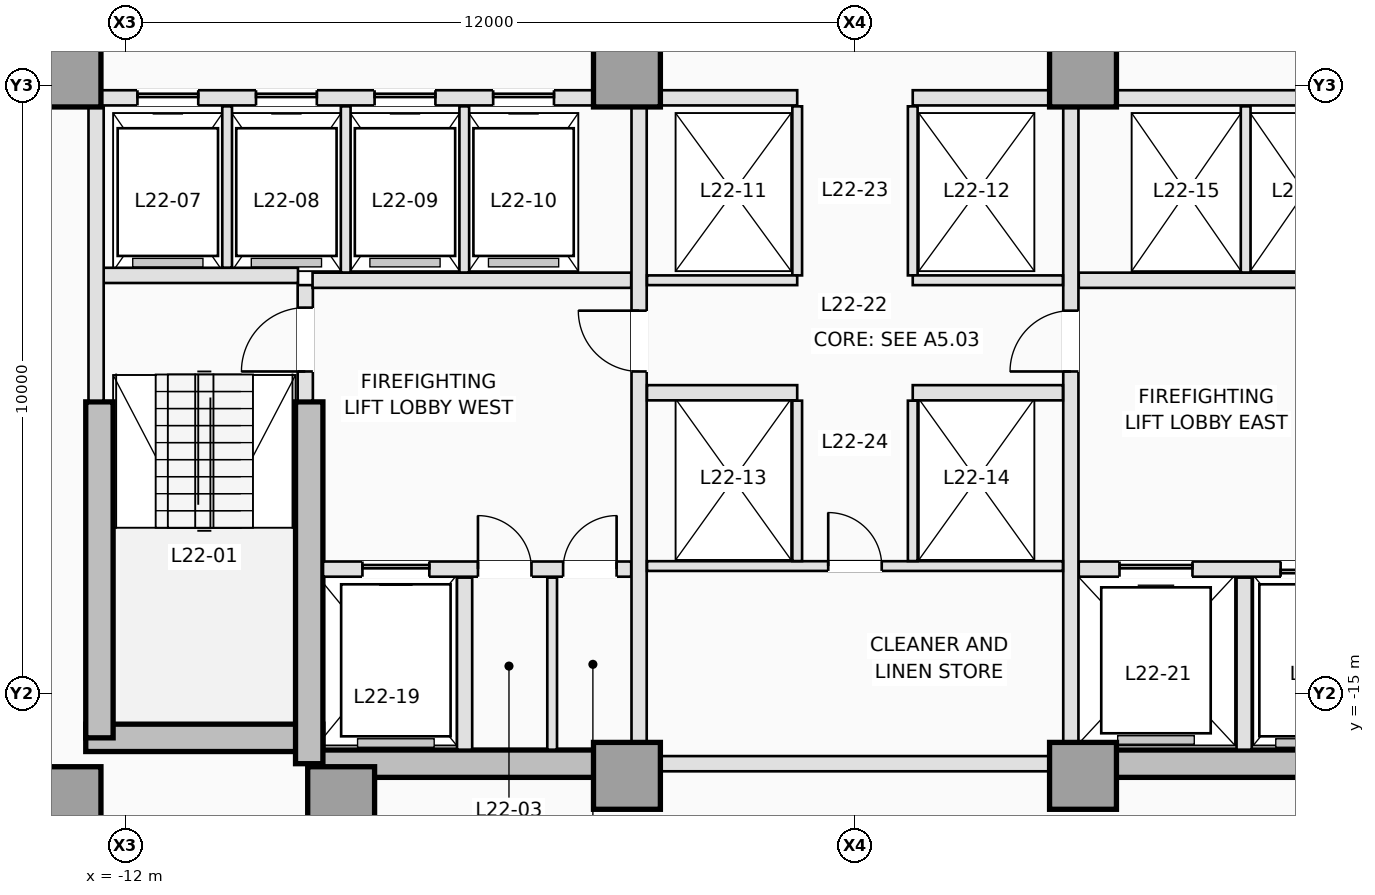
"""IFC4 building model, lengths in metres.
Left out: names, types, materials, properties, quantities, classifications, styles, units other than length and angle.
Written with IfcOpenShell. Run it as: python <this file> out.ifc"""

import sys

from ifc_helpers import new_model, si_unit, direction, frame, frame_2d, origin, origin_2d, place, context, subcontext, project, spatial, rectangle, extrude, element, fill, save


model = new_model("IFC4")
c1 = context("Model", 3, precision=1e-05, world=origin(), true_north=direction((0.0, 1.0)))
c2 = subcontext(c1, "Body", "Model", "MODEL_VIEW")
j1 = project(units=[si_unit("LENGTHUNIT", "METRE"), si_unit("PLANEANGLEUNIT", "RADIAN")], contexts=[c1])
p1 = place(None, origin())
s1 = spatial("IfcSite", under=j1, at=p1, CompositionType="ELEMENT")
p2 = place(p1, origin())
s2 = spatial("IfcBuilding", under=s1, at=p2, CompositionType="ELEMENT")
p3 = place(p2, frame((0.0, 0.0, 83.6)))
s3 = spatial("IfcBuildingStorey", under=s2, at=p3, CompositionType="ELEMENT", Elevation=83.6)
p4 = place(p3, frame((-12.65, -15.725, 0.0), z_axis=(0.0, 0.0, 1.0), x_axis=(1.0, 0.0, 0.0)))
e1 = element("IfcWall", 1, at=p4, inside=s3, PredefinedType="SHEAR", context=c2, shape_type="SweptSolid", body=[
    extrude(rectangle(XDim=3.9, YDim=0.45, at=frame_2d((1.95, 0.0))), origin(), (0.0, 0.0, 1.0), 3.5),
])
for number, where, z_axis, x_axis in (
    (2, (-8.975, -16.15, 0.0), (0.0, 0.0, 1.0), (1.0, 0.0, 0.0)),
    (3, (3.75, -16.15, 0.0), (0.0, 0.0, 1.0), (1.0, 0.0, 0.0)),
):
    element("IfcWall", number, at=place(p3, frame(where, z_axis=z_axis, x_axis=x_axis)), inside=s3, PredefinedType="SHEAR", context=c2, shape_type="SweptSolid", body=[
        extrude(rectangle(XDim=5.225, YDim=0.45, at=frame_2d((2.613, 0.0))), origin(), (0.0, 0.0, 1.0), 3.5),
    ])
p5 = place(p3, frame((-12.425, -15.725, 0.0), z_axis=(0.0, 0.0, 1.0), x_axis=(0.0, 1.0, 0.0)))
e4 = element("IfcWall", 4, at=p5, inside=s3, PredefinedType="SHEAR", context=c2, shape_type="SweptSolid", body=[
    extrude(rectangle(XDim=5.525, YDim=0.45, at=frame_2d((2.763, 0.0))), origin(), (0.0, 0.0, 1.0), 3.5),
])
p6 = place(p3, frame((-8.975, -16.15, 0.0), z_axis=(0.0, 0.0, 1.0), x_axis=(0.0, 1.0, 0.0)))
e5 = element("IfcWall", 5, at=p6, inside=s3, PredefinedType="SHEAR", context=c2, shape_type="SweptSolid", body=[
    extrude(rectangle(XDim=5.95, YDim=0.45, at=frame_2d((2.975, 0.0))), origin(), (0.0, 0.0, 1.0), 3.5),
])
for number, where, z_axis, x_axis in (
    (6, (-12.95, -16.75, 0.0), (0.0, 0.0, 1.0), (1.0, 0.0, 0.0)),
    (7, (-8.45, -16.75, 0.0), (0.0, 0.0, 1.0), (1.0, 0.0, 0.0)),
    (8, (-3.75, -16.35, 0.0), (0.0, 0.0, 1.0), (1.0, 0.0, 0.0)),
    (9, (3.75, -16.35, 0.0), (0.0, 0.0, 1.0), (1.0, 0.0, 0.0)),
    (10, (-12.95, -4.8, 0.0), (0.0, 0.0, 1.0), (1.0, 0.0, 0.0)),
    (11, (-3.75, -4.8, 0.0), (0.0, 0.0, 1.0), (1.0, 0.0, 0.0)),
    (12, (3.75, -4.8, 0.0), (0.0, 0.0, 1.0), (1.0, 0.0, 0.0)),
):
    element("IfcColumn", number, at=place(p3, frame(where, z_axis=z_axis, x_axis=x_axis)), inside=s3, PredefinedType="COLUMN", context=c2, shape_type="SweptSolid", body=[
        extrude(rectangle(XDim=1.1, YDim=1.1, at=origin_2d()), origin(), (0.0, 0.0, 1.0), 3.5),
    ])
p7 = place(p3, frame((-9.04, -10.18, 0.0), z_axis=(0.0, 0.0, 1.0), x_axis=(0.0, 1.0, 0.0)))
e13 = element("IfcWall", 13, at=p7, inside=s3, PredefinedType="PARTITIONING", context=c2, shape_type="SweptSolid", body=[
    extrude(rectangle(XDim=1.9, YDim=0.25, at=frame_2d((0.95, 0.0))), origin(), (0.0, 0.0, 1.0), 3.25),
])
p8 = place(p7, frame((0.48, 0.0, 0.0)))
e14 = element("IfcOpeningElement", 14, at=p8, cuts=e13, PredefinedType="OPENING", context=c2, shape_type="SweptSolid", body=[
    extrude(rectangle(XDim=1.05, YDim=2.15, at=frame_2d((0.525, 1.075))), frame((0.0, 0.135, 0.0), z_axis=(0.0, -1.0, 0.0), x_axis=(1.0, 0.0, 0.0)), (0.0, 0.0, 1.0), 0.27),
])
p9 = place(p3, frame((-12.38, -8.12, 0.0), z_axis=(0.0, 0.0, 1.0), x_axis=(1.0, 0.0, 0.0)))
e15 = element("IfcWall", 15, at=p9, inside=s3, PredefinedType="PARTITIONING", context=c2, shape_type="SweptSolid", body=[
    extrude(rectangle(XDim=3.22, YDim=0.25, at=frame_2d((1.61, 0.0))), origin(), (0.0, 0.0, 1.0), 3.25),
])
p10 = place(p3, frame((-12.48, -10.18, 0.0), z_axis=(0.0, 0.0, 1.0), x_axis=(0.0, 1.0, 0.0)))
e16 = element("IfcWall", 16, at=p10, inside=s3, PredefinedType="PARTITIONING", context=c2, shape_type="SweptSolid", body=[
    extrude(rectangle(XDim=4.828, YDim=0.25, at=frame_2d((2.414, 0.0))), origin(), (0.0, 0.0, 1.0), 3.25),
])
p11 = place(p3, frame((-8.748, -12.95, 0.0), z_axis=(0.0, 0.0, 1.0), x_axis=(1.0, 0.0, 0.0)))
e17 = element("IfcWall", 17, at=p11, inside=s3, PredefinedType="PARTITIONING", context=c2, shape_type="SweptSolid", body=[
    extrude(rectangle(XDim=5.068, YDim=0.25, at=frame_2d((2.534, 0.0))), origin(), (0.0, 0.0, 1.0), 3.25),
])
p12 = place(p11, frame((0.648, 0.0, 0.0)))
e18 = element("IfcOpeningElement", 18, at=p12, cuts=e17, PredefinedType="OPENING", context=c2, shape_type="SweptSolid", body=[
    extrude(rectangle(XDim=1.1, YDim=2.15, at=frame_2d((0.55, 1.075))), frame((0.0, 0.135, 0.0), z_axis=(0.0, -1.0, 0.0), x_axis=(1.0, 0.0, 0.0)), (0.0, 0.0, 1.0), 0.27),
])
p13 = place(p11, frame((2.548, 0.0, 0.0)))
e19 = element("IfcOpeningElement", 19, at=p13, cuts=e17, PredefinedType="OPENING", context=c2, shape_type="SweptSolid", body=[
    extrude(rectangle(XDim=0.88, YDim=2.1, at=frame_2d((0.44, 1.05))), frame((0.0, 0.135, 0.0), z_axis=(0.0, -1.0, 0.0), x_axis=(1.0, 0.0, 0.0)), (0.0, 0.0, 1.0), 0.27),
])
p14 = place(p11, frame((3.948, 0.0, 0.0)))
e20 = element("IfcOpeningElement", 20, at=p14, cuts=e17, PredefinedType="OPENING", context=c2, shape_type="SweptSolid", body=[
    extrude(rectangle(XDim=0.88, YDim=2.1, at=frame_2d((0.44, 1.05))), frame((0.0, 0.135, 0.0), z_axis=(0.0, -1.0, 0.0), x_axis=(1.0, 0.0, 0.0)), (0.0, 0.0, 1.0), 0.27),
])
p15 = place(p3, frame((3.68, -12.95, 0.0), z_axis=(0.0, 0.0, 1.0), x_axis=(1.0, 0.0, 0.0)))
e21 = element("IfcWall", 21, at=p15, inside=s3, PredefinedType="PARTITIONING", context=c2, shape_type="SweptSolid", body=[
    extrude(rectangle(XDim=5.068, YDim=0.25, at=frame_2d((2.534, 0.0))), origin(), (0.0, 0.0, 1.0), 3.25),
])
p16 = place(p15, frame((3.32, 0.0, 0.0)))
e22 = element("IfcOpeningElement", 22, at=p16, cuts=e21, PredefinedType="OPENING", context=c2, shape_type="SweptSolid", body=[
    extrude(rectangle(XDim=1.1, YDim=2.15, at=frame_2d((0.55, 1.075))), frame((0.0, 0.135, 0.0), z_axis=(0.0, -1.0, 0.0), x_axis=(1.0, 0.0, 0.0)), (0.0, 0.0, 1.0), 0.27),
])
p17 = place(p15, frame((0.67, 0.0, 0.0)))
e23 = element("IfcOpeningElement", 23, at=p17, cuts=e21, PredefinedType="OPENING", context=c2, shape_type="SweptSolid", body=[
    extrude(rectangle(XDim=1.2, YDim=2.15, at=frame_2d((0.6, 1.075))), frame((0.0, 0.135, 0.0), z_axis=(0.0, -1.0, 0.0), x_axis=(1.0, 0.0, 0.0)), (0.0, 0.0, 1.0), 0.27),
])
p18 = place(p3, frame((-6.42, -15.92, 0.0), z_axis=(0.0, 0.0, 1.0), x_axis=(0.0, 1.0, 0.0)))
e24 = element("IfcWall", 24, at=p18, inside=s3, PredefinedType="PARTITIONING", context=c2, shape_type="SweptSolid", body=[
    extrude(rectangle(XDim=2.83, YDim=0.25, at=frame_2d((1.415, 0.0))), origin(), (0.0, 0.0, 1.0), 3.25),
])
p19 = place(p3, frame((-4.98, -15.92, 0.0), z_axis=(0.0, 0.0, 1.0), x_axis=(0.0, 1.0, 0.0)))
e25 = element("IfcWall", 25, at=p19, inside=s3, PredefinedType="PARTITIONING", context=c2, shape_type="SweptSolid", body=[
    extrude(rectangle(XDim=2.83, YDim=0.16, at=frame_2d((1.415, 0.0))), origin(), (0.0, 0.0, 1.0), 3.25),
])
p20 = place(p3, frame((6.4, -15.92, 0.0), z_axis=(0.0, 0.0, 1.0), x_axis=(0.0, 1.0, 0.0)))
e26 = element("IfcWall", 26, at=p20, inside=s3, PredefinedType="PARTITIONING", context=c2, shape_type="SweptSolid", body=[
    extrude(rectangle(XDim=2.83, YDim=0.25, at=frame_2d((1.415, 0.0))), origin(), (0.0, 0.0, 1.0), 3.25),
])
for number, where, z_axis, x_axis in (
    (27, (-8.92, -8.2, 0.0), (0.0, 0.0, 1.0), (1.0, 0.0, 0.0)),
    (28, (3.68, -8.2, 0.0), (0.0, 0.0, 1.0), (1.0, 0.0, 0.0)),
):
    element("IfcWall", number, at=place(p3, frame(where, z_axis=z_axis, x_axis=x_axis)), inside=s3, PredefinedType="PARTITIONING", context=c2, shape_type="SweptSolid", body=[
        extrude(rectangle(XDim=5.24, YDim=0.25, at=frame_2d((2.62, 0.0))), origin(), (0.0, 0.0, 1.0), 3.25),
    ])
p21 = place(p3, frame((-3.55, -15.798, 0.0), z_axis=(0.0, 0.0, 1.0), x_axis=(0.0, 1.0, 0.0)))
e29 = element("IfcWall", 29, at=p21, inside=s3, PredefinedType="PARTITIONING", context=c2, shape_type="SweptSolid", body=[
    extrude(rectangle(XDim=10.446, YDim=0.25, at=frame_2d((5.223, 0.0))), origin(), (0.0, 0.0, 1.0), 3.25),
])
p22 = place(p21, frame((6.098, 0.0, 0.0)))
e30 = element("IfcOpeningElement", 30, at=p22, cuts=e29, PredefinedType="OPENING", context=c2, shape_type="SweptSolid", body=[
    extrude(rectangle(XDim=1.0, YDim=2.15, at=frame_2d((0.5, 1.075))), frame((0.0, 0.135, 0.0), z_axis=(0.0, -1.0, 0.0), x_axis=(1.0, 0.0, 0.0)), (0.0, 0.0, 1.0), 0.27),
])
p23 = place(p3, frame((3.55, -15.798, 0.0), z_axis=(0.0, 0.0, 1.0), x_axis=(0.0, 1.0, 0.0)))
e31 = element("IfcWall", 31, at=p23, inside=s3, PredefinedType="PARTITIONING", context=c2, shape_type="SweptSolid", body=[
    extrude(rectangle(XDim=10.446, YDim=0.25, at=frame_2d((5.223, 0.0))), origin(), (0.0, 0.0, 1.0), 3.25),
])
p24 = place(p23, frame((6.098, 0.0, 0.0)))
e32 = element("IfcOpeningElement", 32, at=p24, cuts=e31, PredefinedType="OPENING", context=c2, shape_type="SweptSolid", body=[
    extrude(rectangle(XDim=1.0, YDim=2.15, at=frame_2d((0.5, 1.075))), frame((0.0, 0.135, 0.0), z_axis=(0.0, -1.0, 0.0), x_axis=(1.0, 0.0, 0.0)), (0.0, 0.0, 1.0), 0.27),
])
p25 = place(p3, frame((-12.398, -5.2, 0.0), z_axis=(0.0, 0.0, 1.0), x_axis=(1.0, 0.0, 0.0)))
e33 = element("IfcWall", 33, at=p25, inside=s3, PredefinedType="PARTITIONING", context=c2, shape_type="SweptSolid", body=[
    extrude(rectangle(XDim=8.096, YDim=0.25, at=frame_2d((4.048, 0.0))), origin(), (0.0, 0.0, 1.0), 3.25),
])
p26 = place(p25, frame((0.598, 0.0, 0.0)))
e34 = element("IfcOpeningElement", 34, at=p26, cuts=e33, PredefinedType="OPENING", context=c2, shape_type="SweptSolid", body=[
    extrude(rectangle(XDim=1.0, YDim=2.15, at=frame_2d((0.5, 1.075))), frame((0.0, 0.135, 0.0), z_axis=(0.0, -1.0, 0.0), x_axis=(1.0, 0.0, 0.0)), (0.0, 0.0, 1.0), 0.27),
])
p27 = place(p25, frame((2.548, 0.0, 0.0)))
e35 = element("IfcOpeningElement", 35, at=p27, cuts=e33, PredefinedType="OPENING", context=c2, shape_type="SweptSolid", body=[
    extrude(rectangle(XDim=1.0, YDim=2.15, at=frame_2d((0.5, 1.075))), frame((0.0, 0.135, 0.0), z_axis=(0.0, -1.0, 0.0), x_axis=(1.0, 0.0, 0.0)), (0.0, 0.0, 1.0), 0.27),
])
p28 = place(p25, frame((4.498, 0.0, 0.0)))
e36 = element("IfcOpeningElement", 36, at=p28, cuts=e33, PredefinedType="OPENING", context=c2, shape_type="SweptSolid", body=[
    extrude(rectangle(XDim=1.0, YDim=2.15, at=frame_2d((0.5, 1.075))), frame((0.0, 0.135, 0.0), z_axis=(0.0, -1.0, 0.0), x_axis=(1.0, 0.0, 0.0)), (0.0, 0.0, 1.0), 0.27),
])
p29 = place(p25, frame((6.448, 0.0, 0.0)))
e37 = element("IfcOpeningElement", 37, at=p29, cuts=e33, PredefinedType="OPENING", context=c2, shape_type="SweptSolid", body=[
    extrude(rectangle(XDim=1.0, YDim=2.15, at=frame_2d((0.5, 1.075))), frame((0.0, 0.135, 0.0), z_axis=(0.0, -1.0, 0.0), x_axis=(1.0, 0.0, 0.0)), (0.0, 0.0, 1.0), 0.27),
])
p30 = place(p3, frame((4.302, -5.2, 0.0), z_axis=(0.0, 0.0, 1.0), x_axis=(1.0, 0.0, 0.0)))
e38 = element("IfcWall", 38, at=p30, inside=s3, PredefinedType="PARTITIONING", context=c2, shape_type="SweptSolid", body=[
    extrude(rectangle(XDim=8.096, YDim=0.25, at=frame_2d((4.048, 0.0))), origin(), (0.0, 0.0, 1.0), 3.25),
])
for number, where, z_axis, x_axis in (
    (39, (-3.198, -5.2, 0.0), (0.0, 0.0, 1.0), (1.0, 0.0, 0.0)),
    (40, (0.95, -5.2, 0.0), (0.0, 0.0, 1.0), (1.0, 0.0, 0.0)),
):
    element("IfcWall", number, at=place(p3, frame(where, z_axis=z_axis, x_axis=x_axis)), inside=s3, PredefinedType="PARTITIONING", context=c2, shape_type="SweptSolid", body=[
        extrude(rectangle(XDim=2.248, YDim=0.25, at=frame_2d((1.124, 0.0))), origin(), (0.0, 0.0, 1.0), 3.25),
    ])
p31 = place(p3, frame((-10.325, -7.993, 0.0), z_axis=(0.0, 0.0, 1.0), x_axis=(0.0, 1.0, 0.0)))
e41 = element("IfcWall", 41, at=p31, inside=s3, PredefinedType="PARTITIONING", context=c2, shape_type="SweptSolid", body=[
    extrude(rectangle(XDim=2.653, YDim=0.16, at=frame_2d((1.326, 0.0))), origin(), (0.0, 0.0, 1.0), 3.25),
])
for number, where, z_axis, x_axis in (
    (42, (-8.375, -8.073, 0.0), (0.0, 0.0, 1.0), (0.0, 1.0, 0.0)),
    (43, (-6.425, -8.073, 0.0), (0.0, 0.0, 1.0), (0.0, 1.0, 0.0)),
    (44, (6.425, -8.073, 0.0), (0.0, 0.0, 1.0), (0.0, 1.0, 0.0)),
):
    element("IfcWall", number, at=place(p3, frame(where, z_axis=z_axis, x_axis=x_axis)), inside=s3, PredefinedType="PARTITIONING", context=c2, shape_type="SweptSolid", body=[
        extrude(rectangle(XDim=2.733, YDim=0.16, at=frame_2d((1.366, 0.0))), origin(), (0.0, 0.0, 1.0), 3.25),
    ])
p32 = place(p3, frame((-3.198, -16.15, 0.0), z_axis=(0.0, 0.0, 1.0), x_axis=(1.0, 0.0, 0.0)))
e45 = element("IfcWall", 45, at=p32, inside=s3, PredefinedType="PARTITIONING", context=c2, shape_type="SweptSolid", body=[
    extrude(rectangle(XDim=6.396, YDim=0.25, at=frame_2d((3.198, 0.0))), origin(), (0.0, 0.0, 1.0), 2.3),
])
for number, where, z_axis, x_axis in (
    (46, (-0.95, -8.12, 0.0), (0.0, 0.0, 1.0), (0.0, 1.0, 0.0)),
    (47, (0.95, -8.12, 0.0), (0.0, 0.0, 1.0), (0.0, 1.0, 0.0)),
):
    element("IfcWall", number, at=place(p3, frame(where, z_axis=z_axis, x_axis=x_axis)), inside=s3, PredefinedType="PARTITIONING", context=c2, shape_type="SweptSolid", body=[
        extrude(rectangle(XDim=2.78, YDim=0.16, at=frame_2d((1.39, 0.0))), origin(), (0.0, 0.0, 1.0), 3.25),
    ])
for number, where, z_axis, x_axis in (
    (48, (-3.42, -8.2, 0.0), (0.0, 0.0, 1.0), (1.0, 0.0, 0.0)),
    (49, (0.95, -8.2, 0.0), (0.0, 0.0, 1.0), (1.0, 0.0, 0.0)),
):
    element("IfcWall", number, at=place(p3, frame(where, z_axis=z_axis, x_axis=x_axis)), inside=s3, PredefinedType="PARTITIONING", context=c2, shape_type="SweptSolid", body=[
        extrude(rectangle(XDim=2.47, YDim=0.16, at=frame_2d((1.235, 0.0))), origin(), (0.0, 0.0, 1.0), 3.25),
    ])
for number, where, z_axis, x_axis in (
    (50, (-3.42, -10.05, 0.0), (0.0, 0.0, 1.0), (1.0, 0.0, 0.0)),
    (51, (0.95, -10.05, 0.0), (0.0, 0.0, 1.0), (1.0, 0.0, 0.0)),
):
    element("IfcWall", number, at=place(p3, frame(where, z_axis=z_axis, x_axis=x_axis)), inside=s3, PredefinedType="PARTITIONING", context=c2, shape_type="SweptSolid", body=[
        extrude(rectangle(XDim=2.47, YDim=0.25, at=frame_2d((1.235, 0.0))), origin(), (0.0, 0.0, 1.0), 3.25),
    ])
p33 = place(p3, frame((-3.42, -12.9, 0.0), z_axis=(0.0, 0.0, 1.0), x_axis=(1.0, 0.0, 0.0)))
e52 = element("IfcWall", 52, at=p33, inside=s3, PredefinedType="PARTITIONING", context=c2, shape_type="SweptSolid", body=[
    extrude(rectangle(XDim=6.84, YDim=0.16, at=frame_2d((3.42, 0.0))), origin(), (0.0, 0.0, 1.0), 3.25),
])
p34 = place(p33, frame((2.98, 0.0, 0.0)))
e53 = element("IfcOpeningElement", 53, at=p34, cuts=e52, PredefinedType="OPENING", context=c2, shape_type="SweptSolid", body=[
    extrude(rectangle(XDim=0.88, YDim=2.12, at=frame_2d((0.44, 1.06))), frame((0.0, 0.09, 0.0), z_axis=(0.0, -1.0, 0.0), x_axis=(1.0, 0.0, 0.0)), (0.0, 0.0, 1.0), 0.18),
])
for number, where, z_axis, x_axis in (
    (54, (-0.95, -12.818, 0.0), (0.0, 0.0, 1.0), (0.0, 1.0, 0.0)),
    (55, (0.95, -12.818, 0.0), (0.0, 0.0, 1.0), (0.0, 1.0, 0.0)),
):
    element("IfcWall", number, at=place(p3, frame(where, z_axis=z_axis, x_axis=x_axis)), inside=s3, PredefinedType="PARTITIONING", context=c2, shape_type="SweptSolid", body=[
        extrude(rectangle(XDim=2.638, YDim=0.16, at=frame_2d((1.319, 0.0))), origin(), (0.0, 0.0, 1.0), 3.25),
    ])
p35 = place(p26, origin())
e56 = element("IfcDoor", 56, at=p35, inside=s3, OperationType="SLIDING_TO_LEFT", PredefinedType="DOOR", context=c2, shape_type="SweptSolid", body=[
    extrude(rectangle(XDim=1.0, YDim=2.15, at=frame_2d((0.5, 1.075))), frame((0.0, 0.025, 0.0), z_axis=(0.0, -1.0, 0.0), x_axis=(1.0, 0.0, 0.0)), (0.0, 0.0, 1.0), 0.05),
])
fill(e34, e56)
p36 = place(p27, origin())
e57 = element("IfcDoor", 57, at=p36, inside=s3, OperationType="SLIDING_TO_LEFT", PredefinedType="DOOR", context=c2, shape_type="SweptSolid", body=[
    extrude(rectangle(XDim=1.0, YDim=2.15, at=frame_2d((0.5, 1.075))), frame((0.0, 0.025, 0.0), z_axis=(0.0, -1.0, 0.0), x_axis=(1.0, 0.0, 0.0)), (0.0, 0.0, 1.0), 0.05),
])
fill(e35, e57)
p37 = place(p28, origin())
e58 = element("IfcDoor", 58, at=p37, inside=s3, OperationType="SLIDING_TO_LEFT", PredefinedType="DOOR", context=c2, shape_type="SweptSolid", body=[
    extrude(rectangle(XDim=1.0, YDim=2.15, at=frame_2d((0.5, 1.075))), frame((0.0, 0.025, 0.0), z_axis=(0.0, -1.0, 0.0), x_axis=(1.0, 0.0, 0.0)), (0.0, 0.0, 1.0), 0.05),
])
fill(e36, e58)
p38 = place(p29, origin())
e59 = element("IfcDoor", 59, at=p38, inside=s3, OperationType="SLIDING_TO_LEFT", PredefinedType="DOOR", context=c2, shape_type="SweptSolid", body=[
    extrude(rectangle(XDim=1.0, YDim=2.15, at=frame_2d((0.5, 1.075))), frame((0.0, 0.025, 0.0), z_axis=(0.0, -1.0, 0.0), x_axis=(1.0, 0.0, 0.0)), (0.0, 0.0, 1.0), 0.05),
])
fill(e37, e59)
p39 = place(p12, origin())
e60 = element("IfcDoor", 60, at=p39, inside=s3, OperationType="SLIDING_TO_LEFT", PredefinedType="DOOR", context=c2, shape_type="SweptSolid", body=[
    extrude(rectangle(XDim=1.1, YDim=2.15, at=frame_2d((0.55, 1.075))), frame((0.0, 0.025, 0.0), z_axis=(0.0, -1.0, 0.0), x_axis=(1.0, 0.0, 0.0)), (0.0, 0.0, 1.0), 0.05),
])
fill(e18, e60)
p40 = place(p16, origin())
e61 = element("IfcDoor", 61, at=p40, inside=s3, OperationType="SLIDING_TO_RIGHT", PredefinedType="DOOR", context=c2, shape_type="SweptSolid", body=[
    extrude(rectangle(XDim=1.1, YDim=2.15, at=frame_2d((0.55, 1.075))), frame((0.0, 0.025, 0.0), z_axis=(0.0, -1.0, 0.0), x_axis=(1.0, 0.0, 0.0)), (0.0, 0.0, 1.0), 0.05),
])
fill(e22, e61)
p41 = place(p17, origin())
e62 = element("IfcDoor", 62, at=p41, inside=s3, OperationType="SLIDING_TO_LEFT", PredefinedType="DOOR", context=c2, shape_type="SweptSolid", body=[
    extrude(rectangle(XDim=1.2, YDim=2.15, at=frame_2d((0.6, 1.075))), frame((0.0, 0.025, 0.0), z_axis=(0.0, -1.0, 0.0), x_axis=(1.0, 0.0, 0.0)), (0.0, 0.0, 1.0), 0.05),
])
fill(e23, e62)
p42 = place(p8, origin())
e63 = element("IfcDoor", 63, at=p42, inside=s3, OperationType="SINGLE_SWING_LEFT", PredefinedType="DOOR", context=c2, shape_type="SweptSolid", body=[
    extrude(rectangle(XDim=1.05, YDim=2.15, at=frame_2d((0.525, 1.075))), frame((0.0, 0.025, 0.0), z_axis=(0.0, -1.0, 0.0), x_axis=(1.0, 0.0, 0.0)), (0.0, 0.0, 1.0), 0.05),
])
fill(e14, e63)
p43 = place(p13, origin())
e64 = element("IfcDoor", 64, at=p43, inside=s3, OperationType="SINGLE_SWING_LEFT", PredefinedType="TRAPDOOR", context=c2, shape_type="SweptSolid", body=[
    extrude(rectangle(XDim=0.88, YDim=2.1, at=frame_2d((0.44, 1.05))), frame((0.0, 0.025, 0.0), z_axis=(0.0, -1.0, 0.0), x_axis=(1.0, 0.0, 0.0)), (0.0, 0.0, 1.0), 0.05),
])
fill(e19, e64)
p44 = place(p14, origin())
e65 = element("IfcDoor", 65, at=p44, inside=s3, OperationType="SINGLE_SWING_RIGHT", PredefinedType="TRAPDOOR", context=c2, shape_type="SweptSolid", body=[
    extrude(rectangle(XDim=0.88, YDim=2.1, at=frame_2d((0.44, 1.05))), frame((0.0, 0.025, 0.0), z_axis=(0.0, -1.0, 0.0), x_axis=(1.0, 0.0, 0.0)), (0.0, 0.0, 1.0), 0.05),
])
fill(e20, e65)
p45 = place(p22, origin())
e66 = element("IfcDoor", 66, at=p45, inside=s3, OperationType="SINGLE_SWING_RIGHT", PredefinedType="DOOR", context=c2, shape_type="SweptSolid", body=[
    extrude(rectangle(XDim=1.0, YDim=2.15, at=frame_2d((0.5, 1.075))), frame((0.0, 0.025, 0.0), z_axis=(0.0, -1.0, 0.0), x_axis=(1.0, 0.0, 0.0)), (0.0, 0.0, 1.0), 0.05),
])
fill(e30, e66)
p46 = place(p24, origin())
e67 = element("IfcDoor", 67, at=p46, inside=s3, OperationType="SINGLE_SWING_LEFT", PredefinedType="DOOR", context=c2, shape_type="SweptSolid", body=[
    extrude(rectangle(XDim=1.0, YDim=2.15, at=frame_2d((0.5, 1.075))), frame((0.0, 0.025, 0.0), z_axis=(0.0, -1.0, 0.0), x_axis=(1.0, 0.0, 0.0)), (0.0, 0.0, 1.0), 0.05),
])
fill(e32, e67)
p47 = place(p34, origin())
e68 = element("IfcDoor", 68, at=p47, inside=s3, OperationType="SINGLE_SWING_LEFT", PredefinedType="DOOR", context=c2, shape_type="SweptSolid", body=[
    extrude(rectangle(XDim=0.88, YDim=2.12, at=frame_2d((0.44, 1.06))), frame((0.0, 0.025, 0.0), z_axis=(0.0, -1.0, 0.0), x_axis=(1.0, 0.0, 0.0)), (0.0, 0.0, 1.0), 0.05),
])
fill(e53, e68)
save(model, sys.argv[1])
